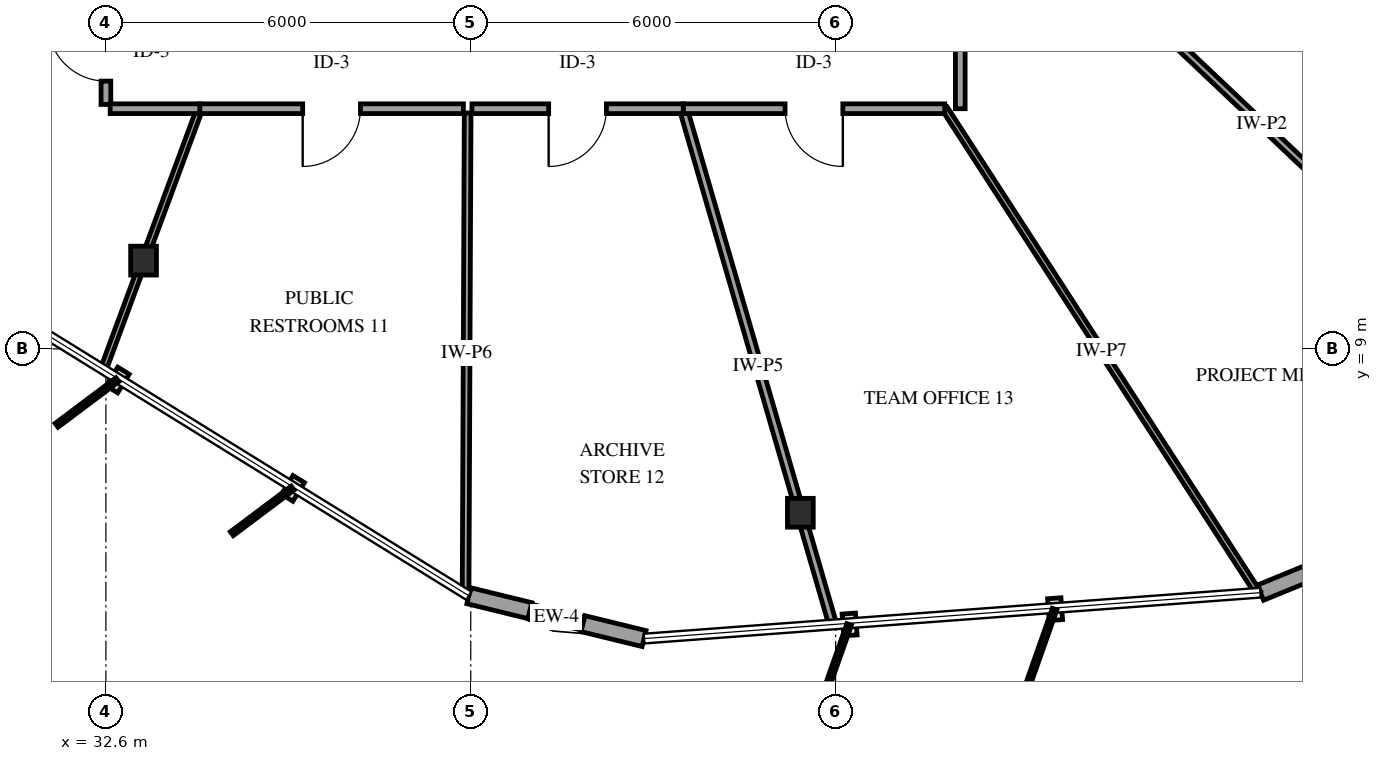
"""IFC4 building model, lengths in metres.
Left out: names, types, materials, properties, quantities, classifications, styles, units other than length and angle.
Written with IfcOpenShell. Run it as: python <this file> out.ifc"""

import sys

from ifc_helpers import new_model, si_unit, direction, frame, frame_2d, origin, origin_2d, place, context, subcontext, project, spatial, rectangle, i_section, extrude, element, fill, save


model = new_model("IFC4")
c1 = context("Model", 3, precision=1e-05, world=origin(), true_north=direction((0.0, 1.0)))
c2 = subcontext(c1, "Body", "Model", "MODEL_VIEW")
j1 = project(units=[si_unit("LENGTHUNIT", "METRE"), si_unit("PLANEANGLEUNIT", "RADIAN")], contexts=[c1])
p1 = place(None, origin())
s1 = spatial("IfcSite", under=j1, at=p1, CompositionType="ELEMENT")
p2 = place(p1, origin())
s2 = spatial("IfcBuilding", under=s1, at=p2, CompositionType="ELEMENT")
p3 = place(p2, frame((0.0, 0.0, 46.6)))
s3 = spatial("IfcBuildingStorey", under=s2, at=p3, CompositionType="ELEMENT", Elevation=46.6)
for number, where, z_axis, x_axis in (
    (1, (33.219, 10.452, 0.0), (0.0, 0.0, 1.0), (1.0, 0.0, 0.0)),
    (2, (44.02, 6.306, 0.0), (0.0, 0.0, 1.0), (1.0, 0.0, 0.0)),
):
    element("IfcColumn", number, at=place(p3, frame(where, z_axis=z_axis, x_axis=x_axis)), inside=s3, PredefinedType="COLUMN", context=c2, shape_type="SweptSolid", body=[
        extrude(i_section(OverallWidth=0.424, OverallDepth=0.474, WebThickness=0.048, FlangeThickness=0.077, FilletRadius=0.038, at=origin_2d()), origin(), (0.0, 0.0, 1.0), 4.0),
    ])
p4 = place(p3, frame((38.568, 4.941, 0.0), z_axis=(0.0, 0.0, 1.0), x_axis=(0.971383395834, -0.237516943182, 0.0)))
e3 = element("IfcWall", 3, at=p4, inside=s3, PredefinedType="SOLIDWALL", context=c2, shape_type="SweptSolid", body=[
    extrude(rectangle(XDim=2.967, YDim=0.27, at=frame_2d((1.483, 0.0))), origin(), (0.0, 0.0, 1.0), 3.079),
])
p5 = place(p4, frame((1.033, 0.0, 0.75)))
e4 = element("IfcOpeningElement", 4, at=p5, cuts=e3, PredefinedType="OPENING", context=c2, shape_type="SweptSolid", body=[
    extrude(rectangle(XDim=0.9, YDim=1.5, at=frame_2d((0.45, 0.75))), frame((0.0, 0.145, 0.0), z_axis=(0.0, -1.0, 0.0), x_axis=(1.0, 0.0, 0.0)), (0.0, 0.0, 1.0), 0.29),
])
p6 = place(p3, frame((51.587, 4.991, 0.0), z_axis=(0.0, 0.0, 1.0), x_axis=(0.925495818017, 0.378757826102, 0.0)))
e5 = element("IfcWall", 5, at=p6, inside=s3, PredefinedType="SOLIDWALL", context=c2, shape_type="SweptSolid", body=[
    extrude(rectangle(XDim=2.966, YDim=0.27, at=frame_2d((1.483, 0.0))), origin(), (0.0, 0.0, 1.0), 3.079),
])
p7 = place(p6, frame((1.033, 0.0, 0.75)))
e6 = element("IfcOpeningElement", 6, at=p7, cuts=e5, PredefinedType="OPENING", context=c2, shape_type="SweptSolid", body=[
    extrude(rectangle(XDim=0.9, YDim=1.5, at=frame_2d((0.45, 0.75))), frame((0.0, 0.145, 0.0), z_axis=(0.0, -1.0, 0.0), x_axis=(1.0, 0.0, 0.0)), (0.0, 0.0, 1.0), 0.29),
])
p8 = place(p3, frame((46.65, 20.689, 0.0), z_axis=(0.0, 0.0, 1.0), x_axis=(0.881590728291, -0.472014605484, 0.0)))
e7 = element("IfcWall", 7, at=p8, inside=s3, PredefinedType="PARTITIONING", context=c2, shape_type="SweptSolid", body=[
    extrude(rectangle(XDim=17.298, YDim=0.14, at=frame_2d((8.649, 0.0))), origin(), (0.0, 0.0, 1.0), 3.078),
])
p9 = place(p3, frame((46.65, 17.385, 0.0), z_axis=(0.0, 0.0, 1.0), x_axis=(0.726430524731, -0.687239909157, 0.0)))
e8 = element("IfcWall", 8, at=p9, inside=s3, PredefinedType="PARTITIONING", context=c2, shape_type="SweptSolid", body=[
    extrude(rectangle(XDim=13.649, YDim=0.12, at=frame_2d((6.824, 0.0))), origin(), (0.0, 0.0, 1.0), 2.995),
])
p10 = place(p3, frame((46.395, 12.95, 0.0), z_axis=(0.0, 0.0, 1.0), x_axis=(0.543180821192, -0.839615742759, 0.0)))
e9 = element("IfcWall", 9, at=p10, inside=s3, PredefinedType="PARTITIONING", context=c2, shape_type="SweptSolid", body=[
    extrude(rectangle(XDim=9.483, YDim=0.1, at=frame_2d((4.741, 0.0))), origin(), (0.0, 0.0, 1.0), 3.078),
])
p11 = place(p3, frame((42.094, 12.95, 0.0), z_axis=(0.0, 0.0, 1.0), x_axis=(0.27851578119, -0.960431652762, 0.0)))
e10 = element("IfcWall", 10, at=p11, inside=s3, PredefinedType="PARTITIONING", context=c2, shape_type="SweptSolid", body=[
    extrude(rectangle(XDim=8.832, YDim=0.13, at=frame_2d((4.416, 0.0))), origin(), (0.0, 0.0, 1.0), 2.995),
])
p12 = place(p3, frame((38.549, 12.88, 0.0), z_axis=(0.0, 0.0, 1.0), x_axis=(-0.004323349132, -0.999990654282, 0.0)))
e11 = element("IfcWall", 11, at=p12, inside=s3, PredefinedType="PARTITIONING", context=c2, shape_type="SweptSolid", body=[
    extrude(rectangle(XDim=7.906, YDim=0.11, at=frame_2d((3.953, 0.0))), origin(), (0.0, 0.0, 1.0), 3.078),
])
p13 = place(p3, frame((34.143, 12.95, 0.0), z_axis=(0.0, 0.0, 1.0), x_axis=(-0.346978836038, -0.937872959063, 0.0)))
e12 = element("IfcWall", 12, at=p13, inside=s3, PredefinedType="PARTITIONING", context=c2, shape_type="SweptSolid", body=[
    extrude(rectangle(XDim=4.574, YDim=0.1, at=frame_2d((2.287, 0.0))), origin(), (0.0, 0.0, 1.0), 2.995),
])
p14 = place(p3, frame((46.65, 17.385, 0.0), z_axis=(0.0, 0.0, 1.0), x_axis=(0.0, -1.0, 0.0)))
e13 = element("IfcWall", 13, at=p14, inside=s3, PredefinedType="PARTITIONING", context=c2, shape_type="SweptSolid", body=[
    extrude(rectangle(XDim=4.435, YDim=0.16, at=frame_2d((2.218, 0.0))), origin(), (0.0, 0.0, 1.0), 3.7),
])
p15 = place(p14, frame((1.743, 0.0, 0.0)))
e14 = element("IfcOpeningElement", 14, at=p15, cuts=e13, PredefinedType="OPENING", context=c2, shape_type="SweptSolid", body=[
    extrude(rectangle(XDim=0.95, YDim=2.15, at=frame_2d((0.475, 1.075))), frame((0.0, 0.09, 0.0), z_axis=(0.0, -1.0, 0.0), x_axis=(1.0, 0.0, 0.0)), (0.0, 0.0, 1.0), 0.18),
])
p16 = place(p3, frame((38.479, 12.95, 0.0), z_axis=(0.0, 0.0, 1.0), x_axis=(-1.0, 0.0, 0.0)))
e15 = element("IfcWall", 15, at=p16, inside=s3, PredefinedType="PARTITIONING", context=c2, shape_type="SweptSolid", body=[
    extrude(rectangle(XDim=4.336, YDim=0.16, at=frame_2d((2.168, 0.0))), origin(), (0.0, 0.0, 1.0), 3.7),
])
p17 = place(p16, frame((1.693, 0.0, 0.0)))
e16 = element("IfcOpeningElement", 16, at=p17, cuts=e15, PredefinedType="OPENING", context=c2, shape_type="SweptSolid", body=[
    extrude(rectangle(XDim=0.95, YDim=2.15, at=frame_2d((0.475, 1.075))), frame((0.0, 0.09, 0.0), z_axis=(0.0, -1.0, 0.0), x_axis=(1.0, 0.0, 0.0)), (0.0, 0.0, 1.0), 0.18),
])
p18 = place(p3, frame((46.395, 12.95, 0.0), z_axis=(0.0, 0.0, 1.0), x_axis=(-1.0, 0.0, 0.0)))
e17 = element("IfcWall", 17, at=p18, inside=s3, PredefinedType="PARTITIONING", context=c2, shape_type="SweptSolid", body=[
    extrude(rectangle(XDim=4.301, YDim=0.16, at=frame_2d((2.15, 0.0))), origin(), (0.0, 0.0, 1.0), 3.7),
])
p19 = place(p18, frame((1.676, 0.0, 0.0)))
e18 = element("IfcOpeningElement", 18, at=p19, cuts=e17, PredefinedType="OPENING", context=c2, shape_type="SweptSolid", body=[
    extrude(rectangle(XDim=0.95, YDim=2.15, at=frame_2d((0.475, 1.075))), frame((0.0, 0.09, 0.0), z_axis=(0.0, -1.0, 0.0), x_axis=(1.0, 0.0, 0.0)), (0.0, 0.0, 1.0), 0.18),
])
p20 = place(p3, frame((42.094, 12.95, 0.0), z_axis=(0.0, 0.0, 1.0), x_axis=(-1.0, 0.0, 0.0)))
e19 = element("IfcWall", 19, at=p20, inside=s3, PredefinedType="PARTITIONING", context=c2, shape_type="SweptSolid", body=[
    extrude(rectangle(XDim=3.475, YDim=0.16, at=frame_2d((1.738, 0.0))), origin(), (0.0, 0.0, 1.0), 3.7),
])
p21 = place(p20, frame((1.263, 0.0, 0.0)))
e20 = element("IfcOpeningElement", 20, at=p21, cuts=e19, PredefinedType="OPENING", context=c2, shape_type="SweptSolid", body=[
    extrude(rectangle(XDim=0.95, YDim=2.15, at=frame_2d((0.475, 1.075))), frame((0.0, 0.09, 0.0), z_axis=(0.0, -1.0, 0.0), x_axis=(1.0, 0.0, 0.0)), (0.0, 0.0, 1.0), 0.18),
])
p22 = place(p3, frame((32.6, 13.02, 0.0), z_axis=(0.0, 0.0, 1.0), x_axis=(0.0, 1.0, 0.0)))
e21 = element("IfcWall", 21, at=p22, inside=s3, PredefinedType="PARTITIONING", context=c2, shape_type="SweptSolid", body=[
    extrude(rectangle(XDim=1.91, YDim=0.16, at=frame_2d((0.955, 0.0))), origin(), (0.0, 0.0, 1.0), 3.7),
])
p23 = place(p22, frame((0.384, 0.0, 0.0)))
e22 = element("IfcOpeningElement", 22, at=p23, cuts=e21, PredefinedType="OPENING", context=c2, shape_type="SweptSolid", body=[
    extrude(rectangle(XDim=0.95, YDim=2.15, at=frame_2d((0.475, 1.075))), frame((0.0, 0.09, 0.0), z_axis=(0.0, -1.0, 0.0), x_axis=(1.0, 0.0, 0.0)), (0.0, 0.0, 1.0), 0.18),
])
p24 = place(p3, frame((34.143, 12.95, 0.0), z_axis=(0.0, 0.0, 1.0), x_axis=(-1.0, 0.0, 0.0)))
e23 = element("IfcWall", 23, at=p24, inside=s3, PredefinedType="PARTITIONING", context=c2, shape_type="SweptSolid", body=[
    extrude(rectangle(XDim=1.473, YDim=0.16, at=frame_2d((0.737, 0.0))), origin(), (0.0, 0.0, 1.0), 3.7),
])
p25 = place(p5, origin())
e24 = element("IfcWindow", 24, at=p25, inside=s3, PartitioningType="SINGLE_PANEL", PredefinedType="WINDOW", context=c2, shape_type="SweptSolid", body=[
    extrude(rectangle(XDim=0.9, YDim=1.5, at=frame_2d((0.45, 0.75))), frame((0.0, 0.03, 0.0), z_axis=(0.0, -1.0, 0.0), x_axis=(1.0, 0.0, 0.0)), (0.0, 0.0, 1.0), 0.06),
])
fill(e4, e24)
p26 = place(p17, origin())
e25 = element("IfcDoor", 25, at=p26, inside=s3, OperationType="SINGLE_SWING_RIGHT", PredefinedType="DOOR", context=c2, shape_type="SweptSolid", body=[
    extrude(rectangle(XDim=0.95, YDim=2.15, at=frame_2d((0.475, 1.075))), frame((0.0, 0.025, 0.0), z_axis=(0.0, -1.0, 0.0), x_axis=(1.0, 0.0, 0.0)), (0.0, 0.0, 1.0), 0.05),
])
fill(e16, e25)
p27 = place(p19, origin())
e26 = element("IfcDoor", 26, at=p27, inside=s3, OperationType="SINGLE_SWING_LEFT", PredefinedType="DOOR", context=c2, shape_type="SweptSolid", body=[
    extrude(rectangle(XDim=0.95, YDim=2.15, at=frame_2d((0.475, 1.075))), frame((0.0, 0.025, 0.0), z_axis=(0.0, -1.0, 0.0), x_axis=(1.0, 0.0, 0.0)), (0.0, 0.0, 1.0), 0.05),
])
fill(e18, e26)
p28 = place(p21, origin())
e27 = element("IfcDoor", 27, at=p28, inside=s3, OperationType="SINGLE_SWING_RIGHT", PredefinedType="DOOR", context=c2, shape_type="SweptSolid", body=[
    extrude(rectangle(XDim=0.95, YDim=2.15, at=frame_2d((0.475, 1.075))), frame((0.0, 0.025, 0.0), z_axis=(0.0, -1.0, 0.0), x_axis=(1.0, 0.0, 0.0)), (0.0, 0.0, 1.0), 0.05),
])
fill(e20, e27)
p29 = place(p23, origin())
e28 = element("IfcDoor", 28, at=p29, inside=s3, OperationType="SINGLE_SWING_RIGHT", PredefinedType="DOOR", context=c2, shape_type="SweptSolid", body=[
    extrude(rectangle(XDim=0.95, YDim=2.15, at=frame_2d((0.475, 1.075))), frame((0.0, 0.025, 0.0), z_axis=(0.0, -1.0, 0.0), x_axis=(1.0, 0.0, 0.0)), (0.0, 0.0, 1.0), 0.05),
])
fill(e22, e28)
save(model, sys.argv[1])
